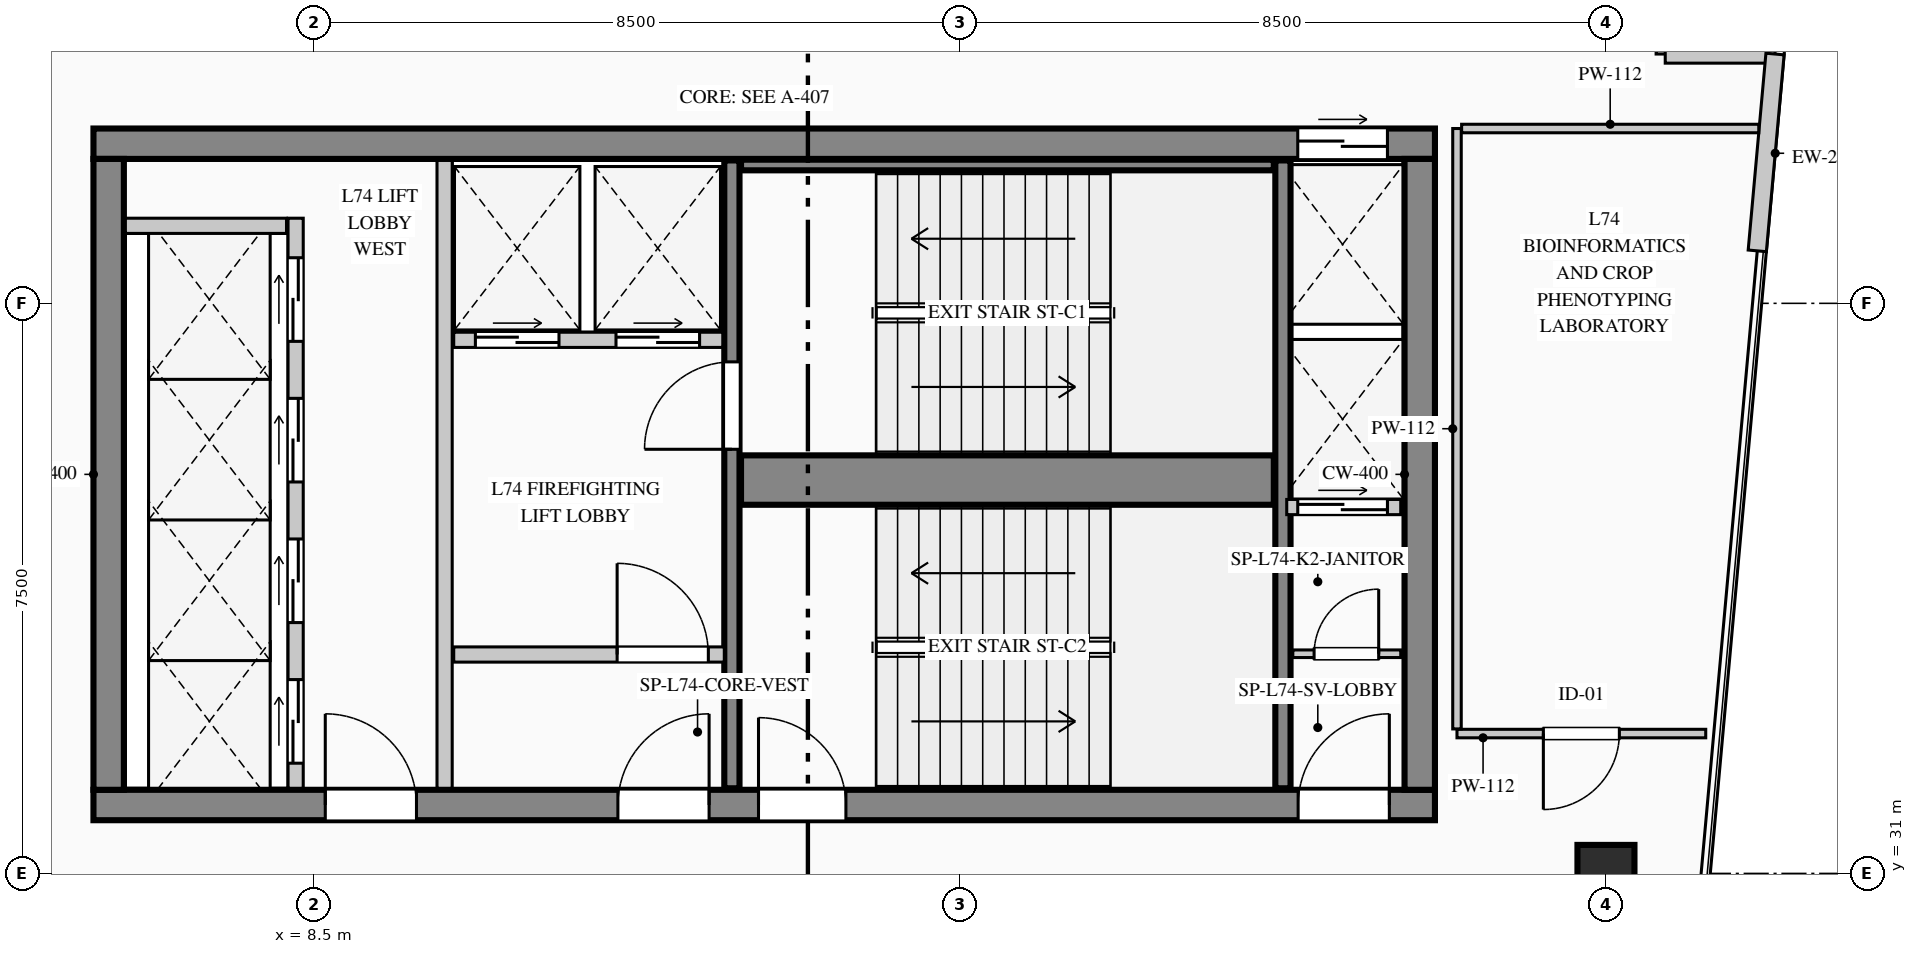
"""IFC4 building model, lengths in metres.
Left out: names, types, materials, properties, quantities, classifications, styles, units other than length and angle.
Written with IfcOpenShell. Run it as: python <this file> out.ifc"""

import sys

from ifc_helpers import new_model, si_unit, direction, frame, frame_2d, origin, origin_2d, place, context, subcontext, project, spatial, rectangle, extrude, element, fill, save


model = new_model("IFC4")
c1 = context("Model", 3, precision=1e-05, world=origin(), true_north=direction((0.0, 1.0)))
c2 = subcontext(c1, "Body", "Model", "MODEL_VIEW")
j1 = project(units=[si_unit("LENGTHUNIT", "METRE"), si_unit("PLANEANGLEUNIT", "RADIAN")], contexts=[c1])
p1 = place(None, origin())
s1 = spatial("IfcSite", under=j1, at=p1, CompositionType="ELEMENT")
p2 = place(p1, origin())
s2 = spatial("IfcBuilding", under=s1, at=p2, CompositionType="ELEMENT")
p3 = place(p2, frame((0.0, 0.0, 308.05)))
s3 = spatial("IfcBuildingStorey", under=s2, at=p3, CompositionType="ELEMENT", Elevation=308.05)
p4 = place(p3, frame((5.6, 40.6, 0.0), z_axis=(0.0, 0.0, 1.0), x_axis=(1.0, 0.0, 0.0)))
e1 = element("IfcWall", 1, at=p4, inside=s3, PredefinedType="SHEAR", context=c2, shape_type="SweptSolid", body=[
    extrude(rectangle(XDim=17.65, YDim=0.4, at=frame_2d((8.825, 0.0))), origin(), (0.0, 0.0, 1.0), 3.95),
])
p5 = place(p4, frame((15.845, 0.0, 0.0)))
e2 = element("IfcOpeningElement", 2, at=p5, cuts=e1, PredefinedType="OPENING", context=c2, shape_type="SweptSolid", body=[
    extrude(rectangle(XDim=1.18, YDim=2.25, at=frame_2d((0.59, 1.125))), frame((0.0, 0.21, 0.0), z_axis=(0.0, -1.0, 0.0), x_axis=(1.0, 0.0, 0.0)), (0.0, 0.0, 1.0), 0.42),
])
p6 = place(p3, frame((5.6, 31.9, 0.0), z_axis=(0.0, 0.0, 1.0), x_axis=(1.0, 0.0, 0.0)))
e3 = element("IfcWall", 3, at=p6, inside=s3, PredefinedType="SHEAR", context=c2, shape_type="SweptSolid", body=[
    extrude(rectangle(XDim=17.65, YDim=0.4, at=frame_2d((8.825, 0.0))), origin(), (0.0, 0.0, 1.0), 3.95),
])
p7 = place(p6, frame((3.05, 0.0, 0.0)))
e4 = element("IfcOpeningElement", 4, at=p7, cuts=e3, PredefinedType="OPENING", context=c2, shape_type="SweptSolid", body=[
    extrude(rectangle(XDim=1.2, YDim=2.2, at=frame_2d((0.6, 1.1))), frame((0.0, 0.21, 0.0), z_axis=(0.0, -1.0, 0.0), x_axis=(1.0, 0.0, 0.0)), (0.0, 0.0, 1.0), 0.42),
])
p8 = place(p6, frame((6.9, 0.0, 0.0)))
e5 = element("IfcOpeningElement", 5, at=p8, cuts=e3, PredefinedType="OPENING", context=c2, shape_type="SweptSolid", body=[
    extrude(rectangle(XDim=1.2, YDim=2.2, at=frame_2d((0.6, 1.1))), frame((0.0, 0.21, 0.0), z_axis=(0.0, -1.0, 0.0), x_axis=(1.0, 0.0, 0.0)), (0.0, 0.0, 1.0), 0.42),
])
p9 = place(p6, frame((8.75, 0.0, 0.0)))
e6 = element("IfcOpeningElement", 6, at=p9, cuts=e3, PredefinedType="OPENING", context=c2, shape_type="SweptSolid", body=[
    extrude(rectangle(XDim=1.15, YDim=2.2, at=frame_2d((0.575, 1.1))), frame((0.0, 0.21, 0.0), z_axis=(0.0, -1.0, 0.0), x_axis=(1.0, 0.0, 0.0)), (0.0, 0.0, 1.0), 0.42),
])
p10 = place(p6, frame((15.85, 0.0, 0.0)))
e7 = element("IfcOpeningElement", 7, at=p10, cuts=e3, PredefinedType="OPENING", context=c2, shape_type="SweptSolid", body=[
    extrude(rectangle(XDim=1.2, YDim=2.2, at=frame_2d((0.6, 1.1))), frame((0.0, 0.21, 0.0), z_axis=(0.0, -1.0, 0.0), x_axis=(1.0, 0.0, 0.0)), (0.0, 0.0, 1.0), 0.42),
])
for number, where, z_axis, x_axis in (
    (8, (5.8, 32.1, 0.0), (0.0, 0.0, 1.0), (0.0, 1.0, 0.0)),
    (9, (23.05, 32.1, 0.0), (0.0, 0.0, 1.0), (0.0, 1.0, 0.0)),
):
    element("IfcWall", number, at=place(p3, frame(where, z_axis=z_axis, x_axis=x_axis)), inside=s3, PredefinedType="SHEAR", context=c2, shape_type="SweptSolid", body=[
        extrude(rectangle(XDim=8.3, YDim=0.4, at=frame_2d((4.15, 0.0))), origin(), (0.0, 0.0, 1.0), 3.95),
    ])
p11 = place(p3, frame((14.0, 32.12, 0.0), z_axis=(0.0, 0.0, 1.0), x_axis=(0.0, 1.0, 0.0)))
e10 = element("IfcWall", 10, at=p11, inside=s3, PredefinedType="SHEAR", context=c2, shape_type="SweptSolid", body=[
    extrude(rectangle(XDim=8.26, YDim=0.2, at=frame_2d((4.13, 0.0))), origin(), (0.0, 0.0, 1.0), 3.95),
])
p12 = place(p11, frame((4.46, 0.0, 0.0)))
e11 = element("IfcOpeningElement", 11, at=p12, cuts=e10, PredefinedType="OPENING", context=c2, shape_type="SweptSolid", body=[
    extrude(rectangle(XDim=1.15, YDim=2.2, at=frame_2d((0.575, 1.1))), frame((0.0, 0.11, 0.0), z_axis=(0.0, -1.0, 0.0), x_axis=(1.0, 0.0, 0.0)), (0.0, 0.0, 1.0), 0.22),
])
p13 = place(p3, frame((14.12, 36.175, 0.0), z_axis=(0.0, 0.0, 1.0), x_axis=(1.0, 0.0, 0.0)))
e12 = element("IfcWall", 12, at=p13, inside=s3, PredefinedType="SHEAR", context=c2, shape_type="SweptSolid", body=[
    extrude(rectangle(XDim=7.01, YDim=0.65, at=frame_2d((3.505, 0.0))), origin(), (0.0, 0.0, 1.0), 3.95),
])
p14 = place(p3, frame((21.25, 32.12, 0.0), z_axis=(0.0, 0.0, 1.0), x_axis=(0.0, 1.0, 0.0)))
e13 = element("IfcWall", 13, at=p14, inside=s3, PredefinedType="SHEAR", context=c2, shape_type="SweptSolid", body=[
    extrude(rectangle(XDim=8.26, YDim=0.2, at=frame_2d((4.13, 0.0))), origin(), (0.0, 0.0, 1.0), 3.95),
])
p15 = place(p3, frame((14.12, 40.32, 0.0), z_axis=(0.0, 0.0, 1.0), x_axis=(1.0, 0.0, 0.0)))
e14 = element("IfcWall", 14, at=p15, inside=s3, PredefinedType="SHEAR", context=c2, shape_type="SweptSolid", body=[
    extrude(rectangle(XDim=7.01, YDim=0.14, at=frame_2d((3.505, 0.0))), origin(), (0.0, 0.0, 1.0), 3.95),
])
p16 = place(p3, frame((25.5, 31.0, 0.0), z_axis=(0.0, 0.0, 1.0), x_axis=(1.0, 0.0, 0.0)))
e15 = element("IfcColumn", 15, at=p16, inside=s3, PredefinedType="COLUMN", context=c2, shape_type="SweptSolid", body=[
    extrude(rectangle(XDim=0.75, YDim=0.75, at=origin_2d()), origin(), (0.0, 0.0, 1.0), 3.95),
])
p17 = place(p3, frame((26.28, 43.38, 0.0), z_axis=(0.0, 0.0, 1.0), x_axis=(0.0, -1.0, 0.0)))
e16 = element("IfcWall", 16, at=p17, inside=s3, PredefinedType="STANDARD", context=c2, shape_type="SweptSolid", body=[
    extrude(rectangle(XDim=1.6, YDim=0.24, at=frame_2d((0.8, 0.0))), origin(), (0.0, 0.0, 1.0), 3.7),
])
p18 = place(p3, frame((26.28, 41.78, 0.0), z_axis=(0.0, 0.0, 1.0), x_axis=(1.0, 0.0, 0.0)))
e17 = element("IfcWall", 17, at=p18, inside=s3, PredefinedType="STANDARD", context=c2, shape_type="SweptSolid", body=[
    extrude(rectangle(XDim=1.444, YDim=0.24, at=frame_2d((0.722, 0.0))), origin(), (0.0, 0.0, 1.0), 3.7),
])
p19 = place(p3, frame((27.724, 41.78, 0.0), z_axis=(0.0, 0.0, 1.0), x_axis=(-0.089765303723, -0.995962946222, 0.0)))
e18 = element("IfcWall", 18, at=p19, inside=s3, PredefinedType="STANDARD", context=c2, shape_type="SweptSolid", body=[
    extrude(rectangle(XDim=2.6, YDim=0.24, at=frame_2d((1.3, 0.0))), origin(), (0.0, 0.0, 1.0), 3.7),
])
p20 = place(p3, frame((8.26, 32.12, 0.0), z_axis=(0.0, 0.0, 1.0), x_axis=(0.0, 1.0, 0.0)))
e19 = element("IfcWall", 19, at=p20, inside=s3, PredefinedType="PARTITIONING", context=c2, shape_type="SweptSolid", body=[
    extrude(rectangle(XDim=7.5, YDim=0.2, at=frame_2d((3.75, 0.0))), origin(), (0.0, 0.0, 1.0), 3.7),
])
p21 = place(p20, frame((0.33, 0.0, 0.0)))
e20 = element("IfcOpeningElement", 20, at=p21, cuts=e19, PredefinedType="OPENING", context=c2, shape_type="SweptSolid", body=[
    extrude(rectangle(XDim=1.1, YDim=2.2, at=frame_2d((0.55, 1.1))), frame((0.0, 0.11, 0.0), z_axis=(0.0, -1.0, 0.0), x_axis=(1.0, 0.0, 0.0)), (0.0, 0.0, 1.0), 0.22),
])
p22 = place(p20, frame((2.18, 0.0, 0.0)))
e21 = element("IfcOpeningElement", 21, at=p22, cuts=e19, PredefinedType="OPENING", context=c2, shape_type="SweptSolid", body=[
    extrude(rectangle(XDim=1.1, YDim=2.2, at=frame_2d((0.55, 1.1))), frame((0.0, 0.11, 0.0), z_axis=(0.0, -1.0, 0.0), x_axis=(1.0, 0.0, 0.0)), (0.0, 0.0, 1.0), 0.22),
])
p23 = place(p20, frame((4.03, 0.0, 0.0)))
e22 = element("IfcOpeningElement", 22, at=p23, cuts=e19, PredefinedType="OPENING", context=c2, shape_type="SweptSolid", body=[
    extrude(rectangle(XDim=1.1, YDim=2.2, at=frame_2d((0.55, 1.1))), frame((0.0, 0.11, 0.0), z_axis=(0.0, -1.0, 0.0), x_axis=(1.0, 0.0, 0.0)), (0.0, 0.0, 1.0), 0.22),
])
p24 = place(p20, frame((5.88, 0.0, 0.0)))
e23 = element("IfcOpeningElement", 23, at=p24, cuts=e19, PredefinedType="OPENING", context=c2, shape_type="SweptSolid", body=[
    extrude(rectangle(XDim=1.1, YDim=2.2, at=frame_2d((0.55, 1.1))), frame((0.0, 0.11, 0.0), z_axis=(0.0, -1.0, 0.0), x_axis=(1.0, 0.0, 0.0)), (0.0, 0.0, 1.0), 0.22),
])
p25 = place(p3, frame((6.02, 39.52, 0.0), z_axis=(0.0, 0.0, 1.0), x_axis=(1.0, 0.0, 0.0)))
e24 = element("IfcWall", 24, at=p25, inside=s3, PredefinedType="PARTITIONING", context=c2, shape_type="SweptSolid", body=[
    extrude(rectangle(XDim=2.12, YDim=0.2, at=frame_2d((1.06, 0.0))), origin(), (0.0, 0.0, 1.0), 3.7),
])
p26 = place(p3, frame((10.22, 32.12, 0.0), z_axis=(0.0, 0.0, 1.0), x_axis=(0.0, 1.0, 0.0)))
e25 = element("IfcWall", 25, at=p26, inside=s3, PredefinedType="PARTITIONING", context=c2, shape_type="SweptSolid", body=[
    extrude(rectangle(XDim=8.26, YDim=0.2, at=frame_2d((4.13, 0.0))), origin(), (0.0, 0.0, 1.0), 3.7),
])
p27 = place(p3, frame((10.34, 38.02, 0.0), z_axis=(0.0, 0.0, 1.0), x_axis=(1.0, 0.0, 0.0)))
e26 = element("IfcWall", 26, at=p27, inside=s3, PredefinedType="PARTITIONING", context=c2, shape_type="SweptSolid", body=[
    extrude(rectangle(XDim=3.54, YDim=0.2, at=frame_2d((1.77, 0.0))), origin(), (0.0, 0.0, 1.0), 3.7),
])
p28 = place(p27, frame((0.285, 0.0, 0.0)))
e27 = element("IfcOpeningElement", 27, at=p28, cuts=e26, PredefinedType="OPENING", context=c2, shape_type="SweptSolid", body=[
    extrude(rectangle(XDim=1.1, YDim=2.2, at=frame_2d((0.55, 1.1))), frame((0.0, 0.11, 0.0), z_axis=(0.0, -1.0, 0.0), x_axis=(1.0, 0.0, 0.0)), (0.0, 0.0, 1.0), 0.22),
])
p29 = place(p27, frame((2.135, 0.0, 0.0)))
e28 = element("IfcOpeningElement", 28, at=p29, cuts=e26, PredefinedType="OPENING", context=c2, shape_type="SweptSolid", body=[
    extrude(rectangle(XDim=1.1, YDim=2.2, at=frame_2d((0.55, 1.1))), frame((0.0, 0.11, 0.0), z_axis=(0.0, -1.0, 0.0), x_axis=(1.0, 0.0, 0.0)), (0.0, 0.0, 1.0), 0.22),
])
p30 = place(p3, frame((10.34, 33.88, 0.0), z_axis=(0.0, 0.0, 1.0), x_axis=(1.0, 0.0, 0.0)))
e29 = element("IfcWall", 29, at=p30, inside=s3, PredefinedType="PARTITIONING", context=c2, shape_type="SweptSolid", body=[
    extrude(rectangle(XDim=3.56, YDim=0.2, at=frame_2d((1.78, 0.0))), origin(), (0.0, 0.0, 1.0), 3.7),
])
p31 = place(p30, frame((2.15, 0.0, 0.0)))
e30 = element("IfcOpeningElement", 30, at=p31, cuts=e29, PredefinedType="OPENING", context=c2, shape_type="SweptSolid", body=[
    extrude(rectangle(XDim=1.2, YDim=2.2, at=frame_2d((0.6, 1.1))), frame((0.0, 0.11, 0.0), z_axis=(0.0, -1.0, 0.0), x_axis=(1.0, 0.0, 0.0)), (0.0, 0.0, 1.0), 0.22),
])
p32 = place(p3, frame((21.38, 33.89, 0.0), z_axis=(0.0, 0.0, 1.0), x_axis=(1.0, 0.0, 0.0)))
e31 = element("IfcWall", 31, at=p32, inside=s3, PredefinedType="PARTITIONING", context=c2, shape_type="SweptSolid", body=[
    extrude(rectangle(XDim=1.42, YDim=0.1, at=frame_2d((0.71, 0.0))), origin(), (0.0, 0.0, 1.0), 3.7),
])
p33 = place(p32, frame((0.28, 0.0, 0.0)))
e32 = element("IfcOpeningElement", 32, at=p33, cuts=e31, PredefinedType="OPENING", context=c2, shape_type="SweptSolid", body=[
    extrude(rectangle(XDim=0.85, YDim=2.1, at=frame_2d((0.425, 1.05))), frame((0.0, 0.06, 0.0), z_axis=(0.0, -1.0, 0.0), x_axis=(1.0, 0.0, 0.0)), (0.0, 0.0, 1.0), 0.12),
])
p34 = place(p3, frame((21.3, 35.82, 0.0), z_axis=(0.0, 0.0, 1.0), x_axis=(1.0, 0.0, 0.0)))
e33 = element("IfcWall", 33, at=p34, inside=s3, PredefinedType="PARTITIONING", context=c2, shape_type="SweptSolid", body=[
    extrude(rectangle(XDim=1.5, YDim=0.2, at=frame_2d((0.75, 0.0))), origin(), (0.0, 0.0, 1.0), 3.7),
])
p35 = place(p34, frame((0.145, 0.0, 0.0)))
e34 = element("IfcOpeningElement", 34, at=p35, cuts=e33, PredefinedType="OPENING", context=c2, shape_type="SweptSolid", body=[
    extrude(rectangle(XDim=1.18, YDim=2.25, at=frame_2d((0.59, 1.125))), frame((0.0, 0.11, 0.0), z_axis=(0.0, -1.0, 0.0), x_axis=(1.0, 0.0, 0.0)), (0.0, 0.0, 1.0), 0.22),
])
p36 = place(p3, frame((26.813, 32.84, 0.0), z_axis=(0.0, 0.0, 1.0), x_axis=(-1.0, 0.0, 0.0)))
e35 = element("IfcWall", 35, at=p36, inside=s3, PredefinedType="PARTITIONING", context=c2, shape_type="SweptSolid", body=[
    extrude(rectangle(XDim=3.273, YDim=0.112, at=frame_2d((1.636, 0.0))), origin(), (0.0, 0.0, 1.0), 3.7),
])
p37 = place(p36, frame((1.136, 0.0, 0.0)))
e36 = element("IfcOpeningElement", 36, at=p37, cuts=e35, PredefinedType="OPENING", context=c2, shape_type="SweptSolid", body=[
    extrude(rectangle(XDim=1.0, YDim=2.15, at=frame_2d((0.5, 1.075))), frame((0.0, 0.066, 0.0), z_axis=(0.0, -1.0, 0.0), x_axis=(1.0, 0.0, 0.0)), (0.0, 0.0, 1.0), 0.132),
])
p38 = place(p3, frame((23.54, 32.901, 0.0), z_axis=(0.0, 0.0, 1.0), x_axis=(0.0, 1.0, 0.0)))
e37 = element("IfcWall", 37, at=p38, inside=s3, PredefinedType="PARTITIONING", context=c2, shape_type="SweptSolid", body=[
    extrude(rectangle(XDim=7.899, YDim=0.112, at=frame_2d((3.95, 0.0))), origin(), (0.0, 0.0, 1.0), 3.7),
])
p39 = place(p3, frame((23.601, 40.8, 0.0), z_axis=(0.0, 0.0, 1.0), x_axis=(1.0, 0.0, 0.0)))
e38 = element("IfcWall", 38, at=p39, inside=s3, PredefinedType="PARTITIONING", context=c2, shape_type="SweptSolid", body=[
    extrude(rectangle(XDim=3.909, YDim=0.112, at=frame_2d((1.955, 0.0))), origin(), (0.0, 0.0, 1.0), 3.7),
])
p40 = place(p7, origin())
e39 = element("IfcDoor", 39, at=p40, inside=s3, OperationType="SINGLE_SWING_LEFT", PredefinedType="DOOR", context=c2, shape_type="SweptSolid", body=[
    extrude(rectangle(XDim=1.2, YDim=2.2, at=frame_2d((0.6, 1.1))), frame((0.0, 0.025, 0.0), z_axis=(0.0, -1.0, 0.0), x_axis=(1.0, 0.0, 0.0)), (0.0, 0.0, 1.0), 0.05),
])
fill(e4, e39)
p41 = place(p8, origin())
e40 = element("IfcDoor", 40, at=p41, inside=s3, OperationType="SINGLE_SWING_RIGHT", PredefinedType="DOOR", context=c2, shape_type="SweptSolid", body=[
    extrude(rectangle(XDim=1.2, YDim=2.2, at=frame_2d((0.6, 1.1))), frame((0.0, 0.025, 0.0), z_axis=(0.0, -1.0, 0.0), x_axis=(1.0, 0.0, 0.0)), (0.0, 0.0, 1.0), 0.05),
])
fill(e5, e40)
p42 = place(p9, origin())
e41 = element("IfcDoor", 41, at=p42, inside=s3, OperationType="SINGLE_SWING_LEFT", PredefinedType="DOOR", context=c2, shape_type="SweptSolid", body=[
    extrude(rectangle(XDim=1.15, YDim=2.2, at=frame_2d((0.575, 1.1))), frame((0.0, 0.025, 0.0), z_axis=(0.0, -1.0, 0.0), x_axis=(1.0, 0.0, 0.0)), (0.0, 0.0, 1.0), 0.05),
])
fill(e6, e41)
p43 = place(p10, origin())
e42 = element("IfcDoor", 42, at=p43, inside=s3, OperationType="SINGLE_SWING_RIGHT", PredefinedType="DOOR", context=c2, shape_type="SweptSolid", body=[
    extrude(rectangle(XDim=1.2, YDim=2.2, at=frame_2d((0.6, 1.1))), frame((0.0, 0.025, 0.0), z_axis=(0.0, -1.0, 0.0), x_axis=(1.0, 0.0, 0.0)), (0.0, 0.0, 1.0), 0.05),
])
fill(e7, e42)
p44 = place(p31, origin())
e43 = element("IfcDoor", 43, at=p44, inside=s3, OperationType="SINGLE_SWING_LEFT", PredefinedType="DOOR", context=c2, shape_type="SweptSolid", body=[
    extrude(rectangle(XDim=1.2, YDim=2.2, at=frame_2d((0.6, 1.1))), frame((0.0, 0.025, 0.0), z_axis=(0.0, -1.0, 0.0), x_axis=(1.0, 0.0, 0.0)), (0.0, 0.0, 1.0), 0.05),
])
fill(e30, e43)
p45 = place(p33, origin())
e44 = element("IfcDoor", 44, at=p45, inside=s3, OperationType="SINGLE_SWING_RIGHT", PredefinedType="DOOR", context=c2, shape_type="SweptSolid", body=[
    extrude(rectangle(XDim=0.85, YDim=2.1, at=frame_2d((0.425, 1.05))), frame((0.0, 0.025, 0.0), z_axis=(0.0, -1.0, 0.0), x_axis=(1.0, 0.0, 0.0)), (0.0, 0.0, 1.0), 0.05),
])
fill(e32, e44)
p46 = place(p12, origin())
e45 = element("IfcDoor", 45, at=p46, inside=s3, OperationType="SINGLE_SWING_LEFT", PredefinedType="DOOR", context=c2, shape_type="SweptSolid", body=[
    extrude(rectangle(XDim=1.15, YDim=2.2, at=frame_2d((0.575, 1.1))), frame((0.0, 0.025, 0.0), z_axis=(0.0, -1.0, 0.0), x_axis=(1.0, 0.0, 0.0)), (0.0, 0.0, 1.0), 0.05),
])
fill(e11, e45)
p47 = place(p21, origin())
e46 = element("IfcDoor", 46, at=p47, inside=s3, OperationType="DOUBLE_DOOR_SLIDING", PredefinedType="DOOR", context=c2, shape_type="SweptSolid", body=[
    extrude(rectangle(XDim=1.1, YDim=2.2, at=frame_2d((0.55, 1.1))), frame((0.0, 0.025, 0.0), z_axis=(0.0, -1.0, 0.0), x_axis=(1.0, 0.0, 0.0)), (0.0, 0.0, 1.0), 0.05),
])
fill(e20, e46)
p48 = place(p22, origin())
e47 = element("IfcDoor", 47, at=p48, inside=s3, OperationType="DOUBLE_DOOR_SLIDING", PredefinedType="DOOR", context=c2, shape_type="SweptSolid", body=[
    extrude(rectangle(XDim=1.1, YDim=2.2, at=frame_2d((0.55, 1.1))), frame((0.0, 0.025, 0.0), z_axis=(0.0, -1.0, 0.0), x_axis=(1.0, 0.0, 0.0)), (0.0, 0.0, 1.0), 0.05),
])
fill(e21, e47)
p49 = place(p23, origin())
e48 = element("IfcDoor", 48, at=p49, inside=s3, OperationType="DOUBLE_DOOR_SLIDING", PredefinedType="DOOR", context=c2, shape_type="SweptSolid", body=[
    extrude(rectangle(XDim=1.1, YDim=2.2, at=frame_2d((0.55, 1.1))), frame((0.0, 0.025, 0.0), z_axis=(0.0, -1.0, 0.0), x_axis=(1.0, 0.0, 0.0)), (0.0, 0.0, 1.0), 0.05),
])
fill(e22, e48)
p50 = place(p24, origin())
e49 = element("IfcDoor", 49, at=p50, inside=s3, OperationType="DOUBLE_DOOR_SLIDING", PredefinedType="DOOR", context=c2, shape_type="SweptSolid", body=[
    extrude(rectangle(XDim=1.1, YDim=2.2, at=frame_2d((0.55, 1.1))), frame((0.0, 0.025, 0.0), z_axis=(0.0, -1.0, 0.0), x_axis=(1.0, 0.0, 0.0)), (0.0, 0.0, 1.0), 0.05),
])
fill(e23, e49)
p51 = place(p28, origin())
e50 = element("IfcDoor", 50, at=p51, inside=s3, OperationType="DOUBLE_DOOR_SLIDING", PredefinedType="DOOR", context=c2, shape_type="SweptSolid", body=[
    extrude(rectangle(XDim=1.1, YDim=2.2, at=frame_2d((0.55, 1.1))), frame((0.0, 0.025, 0.0), z_axis=(0.0, -1.0, 0.0), x_axis=(1.0, 0.0, 0.0)), (0.0, 0.0, 1.0), 0.05),
])
fill(e27, e50)
p52 = place(p29, origin())
e51 = element("IfcDoor", 51, at=p52, inside=s3, OperationType="DOUBLE_DOOR_SLIDING", PredefinedType="DOOR", context=c2, shape_type="SweptSolid", body=[
    extrude(rectangle(XDim=1.1, YDim=2.2, at=frame_2d((0.55, 1.1))), frame((0.0, 0.025, 0.0), z_axis=(0.0, -1.0, 0.0), x_axis=(1.0, 0.0, 0.0)), (0.0, 0.0, 1.0), 0.05),
])
fill(e28, e51)
p53 = place(p5, origin())
e52 = element("IfcDoor", 52, at=p53, inside=s3, OperationType="DOUBLE_DOOR_SLIDING", PredefinedType="DOOR", context=c2, shape_type="SweptSolid", body=[
    extrude(rectangle(XDim=1.18, YDim=2.25, at=frame_2d((0.59, 1.125))), frame((0.0, 0.025, 0.0), z_axis=(0.0, -1.0, 0.0), x_axis=(1.0, 0.0, 0.0)), (0.0, 0.0, 1.0), 0.05),
])
fill(e2, e52)
p54 = place(p35, origin())
e53 = element("IfcDoor", 53, at=p54, inside=s3, OperationType="DOUBLE_DOOR_SLIDING", PredefinedType="DOOR", context=c2, shape_type="SweptSolid", body=[
    extrude(rectangle(XDim=1.18, YDim=2.25, at=frame_2d((0.59, 1.125))), frame((0.0, 0.025, 0.0), z_axis=(0.0, -1.0, 0.0), x_axis=(1.0, 0.0, 0.0)), (0.0, 0.0, 1.0), 0.05),
])
fill(e34, e53)
p55 = place(p37, origin())
e54 = element("IfcDoor", 54, at=p55, inside=s3, OperationType="SINGLE_SWING_RIGHT", PredefinedType="DOOR", context=c2, shape_type="SweptSolid", body=[
    extrude(rectangle(XDim=1.0, YDim=2.15, at=frame_2d((0.5, 1.075))), frame((0.0, 0.025, 0.0), z_axis=(0.0, -1.0, 0.0), x_axis=(1.0, 0.0, 0.0)), (0.0, 0.0, 1.0), 0.05),
])
fill(e36, e54)
save(model, sys.argv[1])
